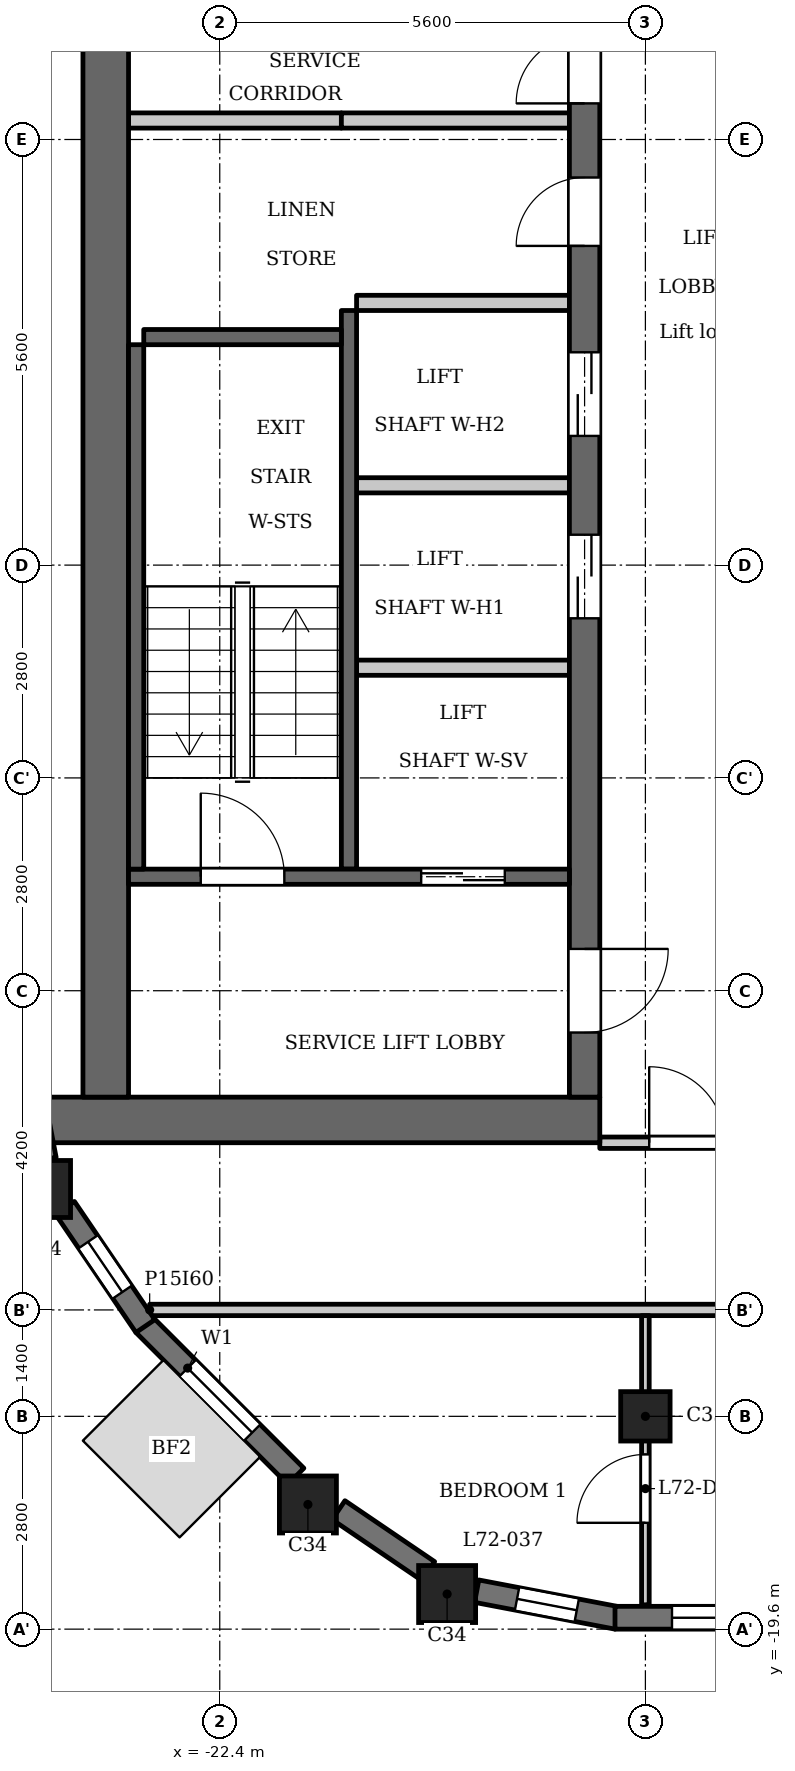
"""IFC4 building model, lengths in metres.
Left out: names, types, materials, properties, quantities, classifications, styles, units other than length and angle.
Written with IfcOpenShell. Run it as: python <this file> out.ifc"""

import sys

from ifc_helpers import new_model, si_unit, direction, frame, frame_2d, origin, origin_2d, place, context, subcontext, project, spatial, rectangle, extrude, element, fill, save


model = new_model("IFC4")
c1 = context("Model", 3, precision=1e-05, world=origin(), true_north=direction((0.0, 1.0)))
c2 = subcontext(c1, "Body", "Model", "MODEL_VIEW")
j1 = project(units=[si_unit("LENGTHUNIT", "METRE"), si_unit("PLANEANGLEUNIT", "RADIAN")], contexts=[c1])
p1 = place(None, origin())
s1 = spatial("IfcSite", under=j1, at=p1, CompositionType="ELEMENT")
p2 = place(p1, origin())
s2 = spatial("IfcBuilding", under=s1, at=p2, CompositionType="ELEMENT")
p3 = place(p2, frame((0.0, 0.0, 276.7)))
s3 = spatial("IfcBuildingStorey", under=s2, at=p3, CompositionType="ELEMENT", Elevation=276.7)
for number, where, z_axis, x_axis in (
    (1, (-19.409, -19.138, 0.0), (0.0, 0.0, 1.0), (1.0, 0.0, 0.0)),
    (2, (-24.738, -13.809, 0.0), (0.0, 0.0, 1.0), (1.0, 0.0, 0.0)),
    (3, (-21.24, -17.96, 0.0), (0.0, 0.0, 1.0), (1.0, 0.0, 0.0)),
):
    element("IfcColumn", number, at=place(p3, frame(where, z_axis=z_axis, x_axis=x_axis)), inside=s3, PredefinedType="COLUMN", context=c2, shape_type="SweptSolid", body=[
        extrude(rectangle(XDim=0.75, YDim=0.75, at=origin_2d()), origin(), (0.0, 0.0, 1.0), 3.5),
    ])
p4 = place(p3, frame((-16.8, -16.8, 0.0), z_axis=(0.0, 0.0, 1.0), x_axis=(1.0, 0.0, 0.0)))
e4 = element("IfcColumn", 4, at=p4, inside=s3, PredefinedType="COLUMN", context=c2, shape_type="SweptSolid", body=[
    extrude(rectangle(XDim=0.65, YDim=0.65, at=origin_2d()), origin(), (0.0, 0.0, 1.0), 3.5),
])
p5 = place(p3, frame((-23.397, -15.591, 0.0), z_axis=(0.0, 0.0, 1.0), x_axis=(0.707106781187, -0.707106781187, 0.0)))
e5 = element("IfcWall", 5, at=p5, inside=s3, PredefinedType="SOLIDWALL", context=c2, shape_type="SweptSolid", body=[
    extrude(rectangle(XDim=2.825, YDim=0.3, at=frame_2d((1.413, 0.0))), origin(), (0.0, 0.0, 1.0), 2.55),
])
p6 = place(p5, frame((0.812, 0.0, 0.6)))
e6 = element("IfcOpeningElement", 6, at=p6, cuts=e5, PredefinedType="OPENING", context=c2, shape_type="SweptSolid", body=[
    extrude(rectangle(XDim=1.2, YDim=1.55, at=frame_2d((0.6, 0.775))), frame((0.0, 0.16, 0.0), z_axis=(0.0, -1.0, 0.0), x_axis=(1.0, 0.0, 0.0)), (0.0, 0.0, 1.0), 0.32),
])
p7 = place(p3, frame((-20.837, -18.034, 0.0), z_axis=(0.0, 0.0, 1.0), x_axis=(0.827095130818, -0.562061957952, 0.0)))
e7 = element("IfcWall", 7, at=p7, inside=s3, PredefinedType="SOLIDWALL", context=c2, shape_type="SweptSolid", body=[
    extrude(rectangle(XDim=1.427, YDim=0.3, at=frame_2d((0.713, 0.0))), origin(), (0.0, 0.0, 1.0), 2.55),
])
p8 = place(p3, frame((-19.02, -19.1, 0.0), z_axis=(0.0, 0.0, 1.0), x_axis=(0.982284001233, -0.187398348234, 0.0)))
e8 = element("IfcWall", 8, at=p8, inside=s3, PredefinedType="SOLIDWALL", context=c2, shape_type="SweptSolid", body=[
    extrude(rectangle(XDim=1.881, YDim=0.3, at=frame_2d((0.941, 0.0))), origin(), (0.0, 0.0, 1.0), 2.55),
])
p9 = place(p8, frame((0.541, 0.0, 0.6)))
e9 = element("IfcOpeningElement", 9, at=p9, cuts=e8, PredefinedType="OPENING", context=c2, shape_type="SweptSolid", body=[
    extrude(rectangle(XDim=0.8, YDim=1.55, at=frame_2d((0.4, 0.775))), frame((0.0, 0.16, 0.0), z_axis=(0.0, -1.0, 0.0), x_axis=(1.0, 0.0, 0.0)), (0.0, 0.0, 1.0), 0.32),
])
p10 = place(p3, frame((-17.2, -19.45, 0.0), z_axis=(0.0, 0.0, 1.0), x_axis=(1.0, 0.0, 0.0)))
e10 = element("IfcWall", 10, at=p10, inside=s3, PredefinedType="SOLIDWALL", context=c2, shape_type="SweptSolid", body=[
    extrude(rectangle(XDim=2.825, YDim=0.3, at=frame_2d((1.413, 0.0))), origin(), (0.0, 0.0, 1.0), 2.55),
])
p11 = place(p10, frame((0.75, 0.0, 0.9)))
e11 = element("IfcOpeningElement", 11, at=p11, cuts=e10, PredefinedType="OPENING", context=c2, shape_type="SweptSolid", body=[
    extrude(rectangle(XDim=1.8, YDim=1.25, at=frame_2d((0.9, 0.625))), frame((0.0, 0.16, 0.0), z_axis=(0.0, -1.0, 0.0), x_axis=(1.0, 0.0, 0.0)), (0.0, 0.0, 1.0), 0.32),
])
p12 = place(p3, frame((-25.053, -11.572, 0.0), z_axis=(0.0, 0.0, 1.0), x_axis=(0.187398348234, -0.982284001233, 0.0)))
e12 = element("IfcWall", 12, at=p12, inside=s3, PredefinedType="SOLIDWALL", context=c2, shape_type="SweptSolid", body=[
    extrude(rectangle(XDim=1.881, YDim=0.3, at=frame_2d((0.941, 0.0))), origin(), (0.0, 0.0, 1.0), 2.55),
])
p13 = place(p3, frame((-24.436, -14.057, 0.0), z_axis=(0.0, 0.0, 1.0), x_axis=(0.562075713892, -0.827085782645, 0.0)))
e13 = element("IfcWall", 13, at=p13, inside=s3, PredefinedType="SOLIDWALL", context=c2, shape_type="SweptSolid", body=[
    extrude(rectangle(XDim=1.881, YDim=0.3, at=frame_2d((0.94, 0.0))), origin(), (0.0, 0.0, 1.0), 2.55),
])
p14 = place(p13, frame((0.541, 0.0, 0.6)))
e14 = element("IfcOpeningElement", 14, at=p14, cuts=e13, PredefinedType="OPENING", context=c2, shape_type="SweptSolid", body=[
    extrude(rectangle(XDim=0.8, YDim=1.55, at=frame_2d((0.4, 0.775))), frame((0.0, 0.16, 0.0), z_axis=(0.0, -1.0, 0.0), x_axis=(1.0, 0.0, 0.0)), (0.0, 0.0, 1.0), 0.32),
])
p15 = place(p3, frame((-20.7, -9.6, 0.0), z_axis=(0.0, 0.0, 1.0), x_axis=(0.0, 1.0, 0.0)))
e15 = element("IfcWall", 15, at=p15, inside=s3, PredefinedType="SHEAR", context=c2, shape_type="SweptSolid", body=[
    extrude(rectangle(XDim=7.35, YDim=0.2, at=frame_2d((3.675, 0.0))), origin(), (0.0, 0.0, 1.0), 3.2),
])
p16 = place(p3, frame((-20.8, 0.25, 0.0), z_axis=(0.0, 0.0, 1.0), x_axis=(-1.0, 0.0, 0.0)))
e16 = element("IfcWall", 16, at=p16, inside=s3, PredefinedType="PARTITIONING", context=c2, shape_type="SweptSolid", body=[
    extrude(rectangle(XDim=2.8, YDim=0.2, at=frame_2d((1.4, 0.0))), origin(), (0.0, 0.0, 1.0), 3.2),
])
p17 = place(p3, frame((-17.4, -12.9, 0.0), z_axis=(0.0, 0.0, 1.0), x_axis=(-1.0, 0.0, 0.0)))
e17 = element("IfcWall", 17, at=p17, inside=s3, PredefinedType="SHEAR", context=c2, shape_type="SweptSolid", body=[
    extrude(rectangle(XDim=7.32, YDim=0.6, at=frame_2d((3.66, 0.0))), origin(), (0.0, 0.0, 1.0), 3.2),
])
p18 = place(p3, frame((-17.6, -12.6, 0.0), z_axis=(0.0, 0.0, 1.0), x_axis=(0.0, 1.0, 0.0)))
e18 = element("IfcWall", 18, at=p18, inside=s3, PredefinedType="SHEAR", context=c2, shape_type="SweptSolid", body=[
    extrude(rectangle(XDim=25.2, YDim=0.4, at=frame_2d((12.6, 0.0))), origin(), (0.0, 0.0, 1.0), 3.2),
])
p19 = place(p18, frame((6.3, 0.0, 0.0)))
e19 = element("IfcOpeningElement", 19, at=p19, cuts=e18, PredefinedType="OPENING", context=c2, shape_type="SweptSolid", body=[
    extrude(rectangle(XDim=1.1, YDim=2.1, at=frame_2d((0.55, 1.05))), frame((0.0, 0.21, 0.0), z_axis=(0.0, -1.0, 0.0), x_axis=(1.0, 0.0, 0.0)), (0.0, 0.0, 1.0), 0.42),
])
p20 = place(p18, frame((8.7, 0.0, 0.0)))
e20 = element("IfcOpeningElement", 20, at=p20, cuts=e18, PredefinedType="OPENING", context=c2, shape_type="SweptSolid", body=[
    extrude(rectangle(XDim=1.1, YDim=2.1, at=frame_2d((0.55, 1.05))), frame((0.0, 0.21, 0.0), z_axis=(0.0, -1.0, 0.0), x_axis=(1.0, 0.0, 0.0)), (0.0, 0.0, 1.0), 0.42),
])
p21 = place(p18, frame((11.2, 0.0, 0.0)))
e21 = element("IfcOpeningElement", 21, at=p21, cuts=e18, PredefinedType="OPENING", context=c2, shape_type="SweptSolid", body=[
    extrude(rectangle(XDim=0.9, YDim=2.1, at=frame_2d((0.45, 1.05))), frame((0.0, 0.21, 0.0), z_axis=(0.0, -1.0, 0.0), x_axis=(1.0, 0.0, 0.0)), (0.0, 0.0, 1.0), 0.42),
])
p22 = place(p18, frame((17.05, 0.0, 0.0)))
e22 = element("IfcOpeningElement", 22, at=p22, cuts=e18, PredefinedType="OPENING", context=c2, shape_type="SweptSolid", body=[
    extrude(rectangle(XDim=0.9, YDim=2.1, at=frame_2d((0.45, 1.05))), frame((0.0, 0.21, 0.0), z_axis=(0.0, -1.0, 0.0), x_axis=(1.0, 0.0, 0.0)), (0.0, 0.0, 1.0), 0.42),
])
p23 = place(p18, frame((23.25, 0.0, 0.0)))
e23 = element("IfcOpeningElement", 23, at=p23, cuts=e18, PredefinedType="OPENING", context=c2, shape_type="SweptSolid", body=[
    extrude(rectangle(XDim=1.1, YDim=2.1, at=frame_2d((0.55, 1.05))), frame((0.0, 0.21, 0.0), z_axis=(0.0, -1.0, 0.0), x_axis=(1.0, 0.0, 0.0)), (0.0, 0.0, 1.0), 0.42),
])
p24 = place(p18, frame((0.85, 0.0, 0.0)))
e24 = element("IfcOpeningElement", 24, at=p24, cuts=e18, PredefinedType="OPENING", context=c2, shape_type="SweptSolid", body=[
    extrude(rectangle(XDim=1.1, YDim=2.1, at=frame_2d((0.55, 1.05))), frame((0.0, 0.21, 0.0), z_axis=(0.0, -1.0, 0.0), x_axis=(1.0, 0.0, 0.0)), (0.0, 0.0, 1.0), 0.42),
])
p25 = place(p18, frame((13.075, 0.0, 0.0)))
e25 = element("IfcOpeningElement", 25, at=p25, cuts=e18, PredefinedType="OPENING", context=c2, shape_type="SweptSolid", body=[
    extrude(rectangle(XDim=1.8, YDim=2.1, at=frame_2d((0.9, 1.05))), frame((0.0, 0.21, 0.0), z_axis=(0.0, -1.0, 0.0), x_axis=(1.0, 0.0, 0.0)), (0.0, 0.0, 1.0), 0.42),
])
p26 = place(p3, frame((-23.9, -12.6, 0.0), z_axis=(0.0, 0.0, 1.0), x_axis=(0.0, 1.0, 0.0)))
e26 = element("IfcWall", 26, at=p26, inside=s3, PredefinedType="SHEAR", context=c2, shape_type="SweptSolid", body=[
    extrude(rectangle(XDim=25.2, YDim=0.6, at=frame_2d((12.6, 0.0))), origin(), (0.0, 0.0, 1.0), 3.2),
])
p27 = place(p3, frame((-17.8, -9.7, 0.0), z_axis=(0.0, 0.0, 1.0), x_axis=(-1.0, 0.0, 0.0)))
e27 = element("IfcWall", 27, at=p27, inside=s3, PredefinedType="SHEAR", context=c2, shape_type="SweptSolid", body=[
    extrude(rectangle(XDim=5.8, YDim=0.2, at=frame_2d((2.9, 0.0))), origin(), (0.0, 0.0, 1.0), 3.2),
])
p28 = place(p27, frame((0.85, 0.0, 0.0)))
e28 = element("IfcOpeningElement", 28, at=p28, cuts=e27, PredefinedType="OPENING", context=c2, shape_type="SweptSolid", body=[
    extrude(rectangle(XDim=1.1, YDim=2.1, at=frame_2d((0.55, 1.05))), frame((0.0, 0.11, 0.0), z_axis=(0.0, -1.0, 0.0), x_axis=(1.0, 0.0, 0.0)), (0.0, 0.0, 1.0), 0.22),
])
p29 = place(p27, frame((3.75, 0.0, 0.0)))
e29 = element("IfcOpeningElement", 29, at=p29, cuts=e27, PredefinedType="OPENING", context=c2, shape_type="SweptSolid", body=[
    extrude(rectangle(XDim=1.1, YDim=2.1, at=frame_2d((0.55, 1.05))), frame((0.0, 0.11, 0.0), z_axis=(0.0, -1.0, 0.0), x_axis=(1.0, 0.0, 0.0)), (0.0, 0.0, 1.0), 0.22),
])
for number, where, z_axis, x_axis in (
    (30, (-17.8, -6.95, 0.0), (0.0, 0.0, 1.0), (-1.0, 0.0, 0.0)),
    (31, (-17.8, -4.55, 0.0), (0.0, 0.0, 1.0), (-1.0, 0.0, 0.0)),
    (32, (-17.8, -2.15, 0.0), (0.0, 0.0, 1.0), (-1.0, 0.0, 0.0)),
):
    element("IfcWall", number, at=place(p3, frame(where, z_axis=z_axis, x_axis=x_axis)), inside=s3, PredefinedType="PARTITIONING", context=c2, shape_type="SweptSolid", body=[
        extrude(rectangle(XDim=2.8, YDim=0.2, at=frame_2d((1.4, 0.0))), origin(), (0.0, 0.0, 1.0), 3.2),
    ])
p30 = place(p3, frame((-17.8, 0.25, 0.0), z_axis=(0.0, 0.0, 1.0), x_axis=(-1.0, 0.0, 0.0)))
e33 = element("IfcWall", 33, at=p30, inside=s3, PredefinedType="PARTITIONING", context=c2, shape_type="SweptSolid", body=[
    extrude(rectangle(XDim=3.0, YDim=0.2, at=frame_2d((1.5, 0.0))), origin(), (0.0, 0.0, 1.0), 3.2),
])
p31 = place(p3, frame((-23.5, -9.6, 0.0), z_axis=(0.0, 0.0, 1.0), x_axis=(0.0, 1.0, 0.0)))
e34 = element("IfcWall", 34, at=p31, inside=s3, PredefinedType="SHEAR", context=c2, shape_type="SweptSolid", body=[
    extrude(rectangle(XDim=6.9, YDim=0.2, at=frame_2d((3.45, 0.0))), origin(), (0.0, 0.0, 1.0), 3.2),
])
p32 = place(p3, frame((-20.8, -2.6, 0.0), z_axis=(0.0, 0.0, 1.0), x_axis=(-1.0, 0.0, 0.0)))
e35 = element("IfcWall", 35, at=p32, inside=s3, PredefinedType="SHEAR", context=c2, shape_type="SweptSolid", body=[
    extrude(rectangle(XDim=2.6, YDim=0.2, at=frame_2d((1.3, 0.0))), origin(), (0.0, 0.0, 1.0), 3.2),
])
p33 = place(p3, frame((-23.322, -15.4, 0.0), z_axis=(0.0, 0.0, 1.0), x_axis=(1.0, 0.0, 0.0)))
e36 = element("IfcWall", 36, at=p33, inside=s3, PredefinedType="PARTITIONING", context=c2, shape_type="SweptSolid", body=[
    extrude(rectangle(XDim=46.872, YDim=0.15, at=frame_2d((23.436, 0.0))), origin(), (0.0, 0.0, 1.0), 3.2),
])
p34 = place(p33, frame((13.772, 0.0, 0.0)))
e37 = element("IfcOpeningElement", 37, at=p34, cuts=e36, PredefinedType="OPENING", context=c2, shape_type="SweptSolid", body=[
    extrude(rectangle(XDim=1.0, YDim=2.1, at=frame_2d((0.5, 1.05))), frame((0.0, 0.085, 0.0), z_axis=(0.0, -1.0, 0.0), x_axis=(1.0, 0.0, 0.0)), (0.0, 0.0, 1.0), 0.17),
])
p35 = place(p33, frame((21.772, 0.0, 0.0)))
e38 = element("IfcOpeningElement", 38, at=p35, cuts=e36, PredefinedType="OPENING", context=c2, shape_type="SweptSolid", body=[
    extrude(rectangle(XDim=1.0, YDim=2.1, at=frame_2d((0.5, 1.05))), frame((0.0, 0.085, 0.0), z_axis=(0.0, -1.0, 0.0), x_axis=(1.0, 0.0, 0.0)), (0.0, 0.0, 1.0), 0.17),
])
p36 = place(p33, frame((31.972, 0.0, 0.0)))
e39 = element("IfcOpeningElement", 39, at=p36, cuts=e36, PredefinedType="OPENING", context=c2, shape_type="SweptSolid", body=[
    extrude(rectangle(XDim=1.0, YDim=2.1, at=frame_2d((0.5, 1.05))), frame((0.0, 0.085, 0.0), z_axis=(0.0, -1.0, 0.0), x_axis=(1.0, 0.0, 0.0)), (0.0, 0.0, 1.0), 0.17),
])
p37 = place(p3, frame((-17.4, -13.2, 0.0), z_axis=(0.0, 0.0, 1.0), x_axis=(1.0, 0.0, 0.0)))
e40 = element("IfcWall", 40, at=p37, inside=s3, PredefinedType="PARTITIONING", context=c2, shape_type="SweptSolid", body=[
    extrude(rectangle(XDim=2.325, YDim=0.15, at=frame_2d((1.163, 0.0))), origin(), (0.0, 0.0, 1.0), 3.2),
])
p38 = place(p37, frame((0.65, 0.0, 0.0)))
e41 = element("IfcOpeningElement", 41, at=p38, cuts=e40, PredefinedType="OPENING", context=c2, shape_type="SweptSolid", body=[
    extrude(rectangle(XDim=1.0, YDim=2.1, at=frame_2d((0.5, 1.05))), frame((0.0, 0.085, 0.0), z_axis=(0.0, -1.0, 0.0), x_axis=(1.0, 0.0, 0.0)), (0.0, 0.0, 1.0), 0.17),
])
p39 = place(p3, frame((-16.8, -19.28, 0.0), z_axis=(0.0, 0.0, 1.0), x_axis=(0.0, 1.0, 0.0)))
e42 = element("IfcWall", 42, at=p39, inside=s3, PredefinedType="PARTITIONING", context=c2, shape_type="SweptSolid", body=[
    extrude(rectangle(XDim=3.805, YDim=0.1, at=frame_2d((1.902, 0.0))), origin(), (0.0, 0.0, 1.0), 3.2),
])
p40 = place(p39, frame((1.079, 0.0, 0.0)))
e43 = element("IfcOpeningElement", 43, at=p40, cuts=e42, PredefinedType="OPENING", context=c2, shape_type="SweptSolid", body=[
    extrude(rectangle(XDim=0.9, YDim=2.1, at=frame_2d((0.45, 1.05))), frame((0.0, 0.06, 0.0), z_axis=(0.0, -1.0, 0.0), x_axis=(1.0, 0.0, 0.0)), (0.0, 0.0, 1.0), 0.12),
])
p41 = place(p28, origin())
e44 = element("IfcDoor", 44, at=p41, inside=s3, OperationType="DOUBLE_DOOR_SLIDING", PredefinedType="DOOR", context=c2, shape_type="SweptSolid", body=[
    extrude(rectangle(XDim=1.1, YDim=2.1, at=frame_2d((0.55, 1.05))), frame((0.0, 0.025, 0.0), z_axis=(0.0, -1.0, 0.0), x_axis=(1.0, 0.0, 0.0)), (0.0, 0.0, 1.0), 0.05),
])
fill(e28, e44)
p42 = place(p19, origin())
e45 = element("IfcDoor", 45, at=p42, inside=s3, OperationType="DOUBLE_DOOR_SLIDING", PredefinedType="DOOR", context=c2, shape_type="SweptSolid", body=[
    extrude(rectangle(XDim=1.1, YDim=2.1, at=frame_2d((0.55, 1.05))), frame((0.0, 0.025, 0.0), z_axis=(0.0, -1.0, 0.0), x_axis=(1.0, 0.0, 0.0)), (0.0, 0.0, 1.0), 0.05),
])
fill(e19, e45)
p43 = place(p20, origin())
e46 = element("IfcDoor", 46, at=p43, inside=s3, OperationType="DOUBLE_DOOR_SLIDING", PredefinedType="DOOR", context=c2, shape_type="SweptSolid", body=[
    extrude(rectangle(XDim=1.1, YDim=2.1, at=frame_2d((0.55, 1.05))), frame((0.0, 0.025, 0.0), z_axis=(0.0, -1.0, 0.0), x_axis=(1.0, 0.0, 0.0)), (0.0, 0.0, 1.0), 0.05),
])
fill(e20, e46)
p44 = place(p21, origin())
e47 = element("IfcDoor", 47, at=p44, inside=s3, OperationType="SINGLE_SWING_RIGHT", PredefinedType="DOOR", context=c2, shape_type="SweptSolid", body=[
    extrude(rectangle(XDim=0.9, YDim=2.1, at=frame_2d((0.45, 1.05))), frame((0.0, 0.025, 0.0), z_axis=(0.0, -1.0, 0.0), x_axis=(1.0, 0.0, 0.0)), (0.0, 0.0, 1.0), 0.05),
])
fill(e21, e47)
p45 = place(p24, origin())
e48 = element("IfcDoor", 48, at=p45, inside=s3, OperationType="SINGLE_SWING_RIGHT", PredefinedType="DOOR", context=c2, shape_type="SweptSolid", body=[
    extrude(rectangle(XDim=1.1, YDim=2.1, at=frame_2d((0.55, 1.05))), frame((0.0, 0.025, 0.0), z_axis=(0.0, -1.0, 0.0), x_axis=(1.0, 0.0, 0.0)), (0.0, 0.0, 1.0), 0.05),
])
fill(e24, e48)
p46 = place(p29, origin())
e49 = element("IfcDoor", 49, at=p46, inside=s3, OperationType="SINGLE_SWING_RIGHT", PredefinedType="DOOR", context=c2, shape_type="SweptSolid", body=[
    extrude(rectangle(XDim=1.1, YDim=2.1, at=frame_2d((0.55, 1.05))), frame((0.0, 0.025, 0.0), z_axis=(0.0, -1.0, 0.0), x_axis=(1.0, 0.0, 0.0)), (0.0, 0.0, 1.0), 0.05),
])
fill(e29, e49)
p47 = place(p25, origin())
e50 = element("IfcDoor", 50, at=p47, inside=s3, OperationType="DOUBLE_DOOR_SINGLE_SWING", PredefinedType="DOOR", context=c2, shape_type="SweptSolid", body=[
    extrude(rectangle(XDim=1.8, YDim=2.1, at=frame_2d((0.9, 1.05))), frame((0.0, 0.025, 0.0), z_axis=(0.0, -1.0, 0.0), x_axis=(1.0, 0.0, 0.0)), (0.0, 0.0, 1.0), 0.05),
])
fill(e25, e50)
p48 = place(p38, origin())
e51 = element("IfcDoor", 51, at=p48, inside=s3, OperationType="SINGLE_SWING_RIGHT", PredefinedType="DOOR", context=c2, shape_type="SweptSolid", body=[
    extrude(rectangle(XDim=1.0, YDim=2.1, at=frame_2d((0.5, 1.05))), frame((0.0, 0.025, 0.0), z_axis=(0.0, -1.0, 0.0), x_axis=(1.0, 0.0, 0.0)), (0.0, 0.0, 1.0), 0.05),
])
fill(e41, e51)
p49 = place(p40, origin())
e52 = element("IfcDoor", 52, at=p49, inside=s3, OperationType="SINGLE_SWING_RIGHT", PredefinedType="DOOR", context=c2, shape_type="SweptSolid", body=[
    extrude(rectangle(XDim=0.9, YDim=2.1, at=frame_2d((0.45, 1.05))), frame((0.0, 0.025, 0.0), z_axis=(0.0, -1.0, 0.0), x_axis=(1.0, 0.0, 0.0)), (0.0, 0.0, 1.0), 0.05),
])
fill(e43, e52)
p50 = place(p6, origin())
e53 = element("IfcWindow", 53, at=p50, inside=s3, PartitioningType="SINGLE_PANEL", PredefinedType="WINDOW", context=c2, shape_type="SweptSolid", body=[
    extrude(rectangle(XDim=1.2, YDim=1.55, at=frame_2d((0.6, 0.775))), frame((0.0, 0.03, 0.0), z_axis=(0.0, -1.0, 0.0), x_axis=(1.0, 0.0, 0.0)), (0.0, 0.0, 1.0), 0.06),
])
fill(e6, e53)
p51 = place(p9, origin())
e54 = element("IfcWindow", 54, at=p51, inside=s3, PartitioningType="SINGLE_PANEL", PredefinedType="WINDOW", context=c2, shape_type="SweptSolid", body=[
    extrude(rectangle(XDim=0.8, YDim=1.55, at=frame_2d((0.4, 0.775))), frame((0.0, 0.03, 0.0), z_axis=(0.0, -1.0, 0.0), x_axis=(1.0, 0.0, 0.0)), (0.0, 0.0, 1.0), 0.06),
])
fill(e9, e54)
p52 = place(p11, origin())
e55 = element("IfcWindow", 55, at=p52, inside=s3, PartitioningType="SINGLE_PANEL", PredefinedType="WINDOW", context=c2, shape_type="SweptSolid", body=[
    extrude(rectangle(XDim=1.8, YDim=1.25, at=frame_2d((0.9, 0.625))), frame((0.0, 0.03, 0.0), z_axis=(0.0, -1.0, 0.0), x_axis=(1.0, 0.0, 0.0)), (0.0, 0.0, 1.0), 0.06),
])
fill(e11, e55)
p53 = place(p14, origin())
e56 = element("IfcWindow", 56, at=p53, inside=s3, PartitioningType="SINGLE_PANEL", PredefinedType="WINDOW", context=c2, shape_type="SweptSolid", body=[
    extrude(rectangle(XDim=0.8, YDim=1.55, at=frame_2d((0.4, 0.775))), frame((0.0, 0.03, 0.0), z_axis=(0.0, -1.0, 0.0), x_axis=(1.0, 0.0, 0.0)), (0.0, 0.0, 1.0), 0.06),
])
fill(e14, e56)
save(model, sys.argv[1])
